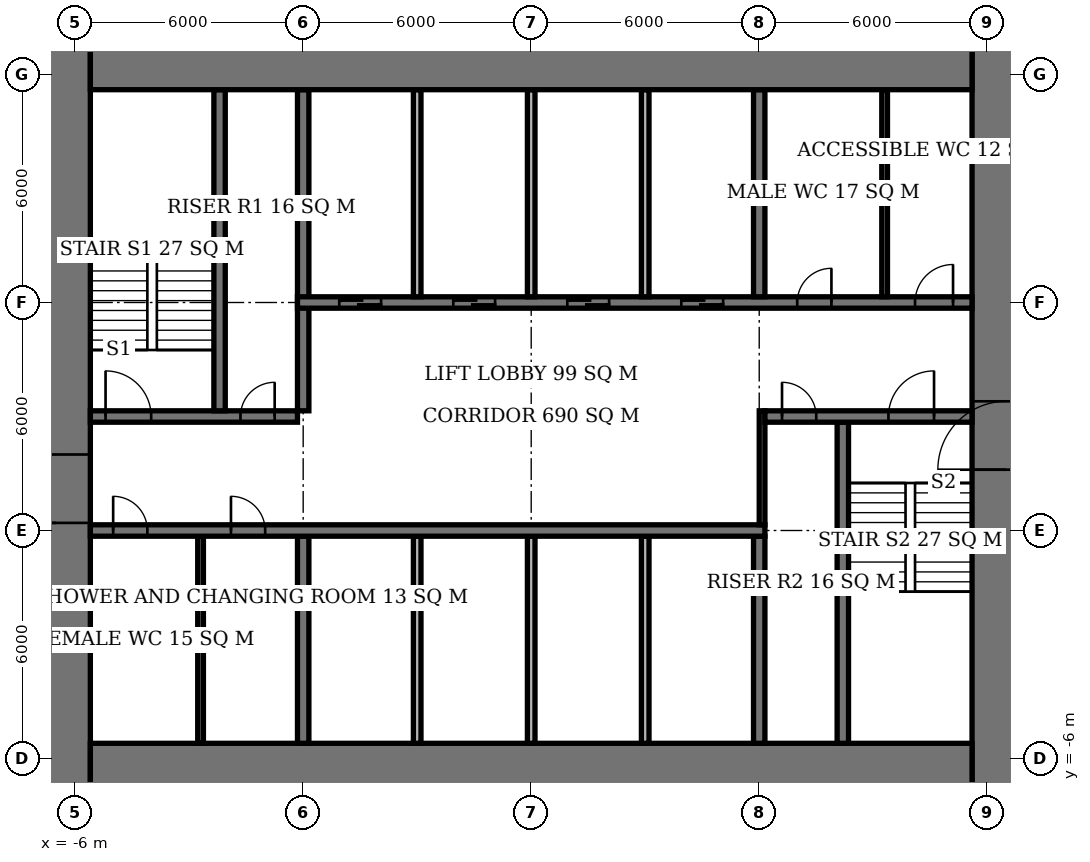
"""IFC4 building model, lengths in metres.
Left out: names, types, materials, properties, quantities, classifications, styles, units other than length and angle.
Written with IfcOpenShell. Run it as: python <this file> out.ifc"""

import sys

from ifc_helpers import new_model, si_unit, direction, frame, frame_2d, origin, place, context, subcontext, project, spatial, rectangle, extrude, element, fill, save


model = new_model("IFC4")
c1 = context("Model", 3, precision=1e-05, world=origin(), true_north=direction((0.0, 1.0)))
c2 = subcontext(c1, "Body", "Model", "MODEL_VIEW")
j1 = project(units=[si_unit("LENGTHUNIT", "METRE"), si_unit("PLANEANGLEUNIT", "RADIAN")], contexts=[c1])
p1 = place(None, origin())
s1 = spatial("IfcSite", under=j1, at=p1, CompositionType="ELEMENT")
p2 = place(p1, origin())
s2 = spatial("IfcBuilding", under=s1, at=p2, CompositionType="ELEMENT")
p3 = place(p2, frame((0.0, 0.0, 72.8)))
s3 = spatial("IfcBuildingStorey", under=s2, at=p3, CompositionType="ELEMENT", Elevation=72.8)
for number, where, z_axis, x_axis in (
    (1, (-5.6, -6.6, 0.0), (0.0, 0.0, 1.0), (1.0, 0.0, 0.0)),
    (2, (-5.6, 12.6, 0.0), (0.0, 0.0, 1.0), (1.0, 0.0, 0.0)),
):
    element("IfcWall", number, at=place(p3, frame(where, z_axis=z_axis, x_axis=x_axis)), inside=s3, PredefinedType="SHEAR", context=c2, shape_type="SweptSolid", body=[
        extrude(rectangle(XDim=23.2, YDim=2.0, at=frame_2d((11.6, 0.0))), origin(), (0.0, 0.0, 1.0), 3.9),
    ])
p4 = place(p3, frame((-6.5, -7.6, 0.0), z_axis=(0.0, 0.0, 1.0), x_axis=(0.0, 1.0, 0.0)))
e3 = element("IfcWall", 3, at=p4, inside=s3, PredefinedType="SHEAR", context=c2, shape_type="SweptSolid", body=[
    extrude(rectangle(XDim=21.2, YDim=1.8, at=frame_2d((10.6, 0.0))), origin(), (0.0, 0.0, 1.0), 3.9),
])
p5 = place(p4, frame((7.8, 0.0, 0.0)))
e4 = element("IfcOpeningElement", 4, at=p5, cuts=e3, PredefinedType="OPENING", context=c2, shape_type="SweptSolid", body=[
    extrude(rectangle(XDim=1.8, YDim=2.4, at=frame_2d((0.9, 1.2))), frame((0.0, 0.91, 0.0), z_axis=(0.0, -1.0, 0.0), x_axis=(1.0, 0.0, 0.0)), (0.0, 0.0, 1.0), 1.82),
])
p6 = place(p3, frame((18.5, -7.6, 0.0), z_axis=(0.0, 0.0, 1.0), x_axis=(0.0, 1.0, 0.0)))
e5 = element("IfcWall", 5, at=p6, inside=s3, PredefinedType="SHEAR", context=c2, shape_type="SweptSolid", body=[
    extrude(rectangle(XDim=21.2, YDim=1.8, at=frame_2d((10.6, 0.0))), origin(), (0.0, 0.0, 1.0), 3.9),
])
p7 = place(p6, frame((9.2, 0.0, 0.0)))
e6 = element("IfcOpeningElement", 6, at=p7, cuts=e5, PredefinedType="OPENING", context=c2, shape_type="SweptSolid", body=[
    extrude(rectangle(XDim=1.8, YDim=2.4, at=frame_2d((0.9, 1.2))), frame((0.0, 0.91, 0.0), z_axis=(0.0, -1.0, 0.0), x_axis=(1.0, 0.0, 0.0)), (0.0, 0.0, 1.0), 1.82),
])
p8 = place(p3, frame((-5.6, 0.0, 0.0), z_axis=(0.0, 0.0, 1.0), x_axis=(1.0, 0.0, 0.0)))
e7 = element("IfcWall", 7, at=p8, inside=s3, PredefinedType="SHEAR", context=c2, shape_type="SweptSolid", body=[
    extrude(rectangle(XDim=17.75, YDim=0.3, at=frame_2d((8.875, 0.0))), origin(), (0.0, 0.0, 1.0), 3.9),
])
p9 = place(p8, frame((0.6, 0.0, 0.0)))
e8 = element("IfcOpeningElement", 8, at=p9, cuts=e7, PredefinedType="OPENING", context=c2, shape_type="SweptSolid", body=[
    extrude(rectangle(XDim=0.9, YDim=2.1, at=frame_2d((0.45, 1.05))), frame((0.0, 0.16, 0.0), z_axis=(0.0, -1.0, 0.0), x_axis=(1.0, 0.0, 0.0)), (0.0, 0.0, 1.0), 0.32),
])
p10 = place(p8, frame((3.7, 0.0, 0.0)))
e9 = element("IfcOpeningElement", 9, at=p10, cuts=e7, PredefinedType="OPENING", context=c2, shape_type="SweptSolid", body=[
    extrude(rectangle(XDim=0.9, YDim=2.1, at=frame_2d((0.45, 1.05))), frame((0.0, 0.16, 0.0), z_axis=(0.0, -1.0, 0.0), x_axis=(1.0, 0.0, 0.0)), (0.0, 0.0, 1.0), 0.32),
])
p11 = place(p3, frame((-5.6, 3.0, 0.0), z_axis=(0.0, 0.0, 1.0), x_axis=(1.0, 0.0, 0.0)))
e10 = element("IfcWall", 10, at=p11, inside=s3, PredefinedType="SHEAR", context=c2, shape_type="SweptSolid", body=[
    extrude(rectangle(XDim=5.45, YDim=0.3, at=frame_2d((2.725, 0.0))), origin(), (0.0, 0.0, 1.0), 3.9),
])
p12 = place(p11, frame((0.4, 0.0, 0.0)))
e11 = element("IfcOpeningElement", 11, at=p12, cuts=e10, PredefinedType="OPENING", context=c2, shape_type="SweptSolid", body=[
    extrude(rectangle(XDim=1.2, YDim=2.1, at=frame_2d((0.6, 1.05))), frame((0.0, 0.16, 0.0), z_axis=(0.0, -1.0, 0.0), x_axis=(1.0, 0.0, 0.0)), (0.0, 0.0, 1.0), 0.32),
])
p13 = place(p11, frame((3.95, 0.0, 0.0)))
e12 = element("IfcOpeningElement", 12, at=p13, cuts=e10, PredefinedType="OPENING", context=c2, shape_type="SweptSolid", body=[
    extrude(rectangle(XDim=0.9, YDim=2.1, at=frame_2d((0.45, 1.05))), frame((0.0, 0.16, 0.0), z_axis=(0.0, -1.0, 0.0), x_axis=(1.0, 0.0, 0.0)), (0.0, 0.0, 1.0), 0.32),
])
p14 = place(p3, frame((12.15, 3.0, 0.0), z_axis=(0.0, 0.0, 1.0), x_axis=(1.0, 0.0, 0.0)))
e13 = element("IfcWall", 13, at=p14, inside=s3, PredefinedType="SHEAR", context=c2, shape_type="SweptSolid", body=[
    extrude(rectangle(XDim=5.45, YDim=0.3, at=frame_2d((2.725, 0.0))), origin(), (0.0, 0.0, 1.0), 3.9),
])
p15 = place(p14, frame((3.25, 0.0, 0.0)))
e14 = element("IfcOpeningElement", 14, at=p15, cuts=e13, PredefinedType="OPENING", context=c2, shape_type="SweptSolid", body=[
    extrude(rectangle(XDim=1.2, YDim=2.1, at=frame_2d((0.6, 1.05))), frame((0.0, 0.16, 0.0), z_axis=(0.0, -1.0, 0.0), x_axis=(1.0, 0.0, 0.0)), (0.0, 0.0, 1.0), 0.32),
])
p16 = place(p14, frame((0.45, 0.0, 0.0)))
e15 = element("IfcOpeningElement", 15, at=p16, cuts=e13, PredefinedType="OPENING", context=c2, shape_type="SweptSolid", body=[
    extrude(rectangle(XDim=0.9, YDim=2.1, at=frame_2d((0.45, 1.05))), frame((0.0, 0.16, 0.0), z_axis=(0.0, -1.0, 0.0), x_axis=(1.0, 0.0, 0.0)), (0.0, 0.0, 1.0), 0.32),
])
p17 = place(p3, frame((-0.15, 6.0, 0.0), z_axis=(0.0, 0.0, 1.0), x_axis=(1.0, 0.0, 0.0)))
e16 = element("IfcWall", 16, at=p17, inside=s3, PredefinedType="SHEAR", context=c2, shape_type="SweptSolid", body=[
    extrude(rectangle(XDim=17.75, YDim=0.3, at=frame_2d((8.875, 0.0))), origin(), (0.0, 0.0, 1.0), 3.9),
])
p18 = place(p17, frame((13.15, 0.0, 0.0)))
e17 = element("IfcOpeningElement", 17, at=p18, cuts=e16, PredefinedType="OPENING", context=c2, shape_type="SweptSolid", body=[
    extrude(rectangle(XDim=0.9, YDim=2.1, at=frame_2d((0.45, 1.05))), frame((0.0, 0.16, 0.0), z_axis=(0.0, -1.0, 0.0), x_axis=(1.0, 0.0, 0.0)), (0.0, 0.0, 1.0), 0.32),
])
p19 = place(p17, frame((16.25, 0.0, 0.0)))
e18 = element("IfcOpeningElement", 18, at=p19, cuts=e16, PredefinedType="OPENING", context=c2, shape_type="SweptSolid", body=[
    extrude(rectangle(XDim=1.0, YDim=2.1, at=frame_2d((0.5, 1.05))), frame((0.0, 0.16, 0.0), z_axis=(0.0, -1.0, 0.0), x_axis=(1.0, 0.0, 0.0)), (0.0, 0.0, 1.0), 0.32),
])
p20 = place(p17, frame((1.1, 0.0, 0.0)))
e19 = element("IfcOpeningElement", 19, at=p20, cuts=e16, PredefinedType="OPENING", context=c2, shape_type="SweptSolid", body=[
    extrude(rectangle(XDim=1.1, YDim=2.1, at=frame_2d((0.55, 1.05))), frame((0.0, 0.16, 0.0), z_axis=(0.0, -1.0, 0.0), x_axis=(1.0, 0.0, 0.0)), (0.0, 0.0, 1.0), 0.32),
])
p21 = place(p17, frame((4.1, 0.0, 0.0)))
e20 = element("IfcOpeningElement", 20, at=p21, cuts=e16, PredefinedType="OPENING", context=c2, shape_type="SweptSolid", body=[
    extrude(rectangle(XDim=1.1, YDim=2.1, at=frame_2d((0.55, 1.05))), frame((0.0, 0.16, 0.0), z_axis=(0.0, -1.0, 0.0), x_axis=(1.0, 0.0, 0.0)), (0.0, 0.0, 1.0), 0.32),
])
p22 = place(p17, frame((7.1, 0.0, 0.0)))
e21 = element("IfcOpeningElement", 21, at=p22, cuts=e16, PredefinedType="OPENING", context=c2, shape_type="SweptSolid", body=[
    extrude(rectangle(XDim=1.1, YDim=2.1, at=frame_2d((0.55, 1.05))), frame((0.0, 0.16, 0.0), z_axis=(0.0, -1.0, 0.0), x_axis=(1.0, 0.0, 0.0)), (0.0, 0.0, 1.0), 0.32),
])
p23 = place(p17, frame((10.1, 0.0, 0.0)))
e22 = element("IfcOpeningElement", 22, at=p23, cuts=e16, PredefinedType="OPENING", context=c2, shape_type="SweptSolid", body=[
    extrude(rectangle(XDim=1.1, YDim=2.1, at=frame_2d((0.55, 1.05))), frame((0.0, 0.16, 0.0), z_axis=(0.0, -1.0, 0.0), x_axis=(1.0, 0.0, 0.0)), (0.0, 0.0, 1.0), 0.32),
])
p24 = place(p3, frame((0.0, -5.6, 0.0), z_axis=(0.0, 0.0, 1.0), x_axis=(0.0, 1.0, 0.0)))
e23 = element("IfcWall", 23, at=p24, inside=s3, PredefinedType="SHEAR", context=c2, shape_type="SweptSolid", body=[
    extrude(rectangle(XDim=5.45, YDim=0.3, at=frame_2d((2.725, 0.0))), origin(), (0.0, 0.0, 1.0), 3.9),
])
p25 = place(p3, frame((0.0, 3.15, 0.0), z_axis=(0.0, 0.0, 1.0), x_axis=(0.0, 1.0, 0.0)))
e24 = element("IfcWall", 24, at=p25, inside=s3, PredefinedType="SHEAR", context=c2, shape_type="SweptSolid", body=[
    extrude(rectangle(XDim=8.45, YDim=0.3, at=frame_2d((4.225, 0.0))), origin(), (0.0, 0.0, 1.0), 3.9),
])
for number, where, z_axis, x_axis in (
    (25, (12.0, -5.6, 0.0), (0.0, 0.0, 1.0), (0.0, 1.0, 0.0)),
    (26, (12.0, 6.15, 0.0), (0.0, 0.0, 1.0), (0.0, 1.0, 0.0)),
):
    element("IfcWall", number, at=place(p3, frame(where, z_axis=z_axis, x_axis=x_axis)), inside=s3, PredefinedType="SHEAR", context=c2, shape_type="SweptSolid", body=[
        extrude(rectangle(XDim=5.45, YDim=0.3, at=frame_2d((2.725, 0.0))), origin(), (0.0, 0.0, 1.0), 3.9),
    ])
for number, where, z_axis, x_axis in (
    (27, (-2.2, 3.15, 0.0), (0.0, 0.0, 1.0), (0.0, 1.0, 0.0)),
    (28, (14.2, -5.6, 0.0), (0.0, 0.0, 1.0), (0.0, 1.0, 0.0)),
):
    element("IfcWall", number, at=place(p3, frame(where, z_axis=z_axis, x_axis=x_axis)), inside=s3, PredefinedType="SHEAR", context=c2, shape_type="SweptSolid", body=[
        extrude(rectangle(XDim=8.45, YDim=0.3, at=frame_2d((4.225, 0.0))), origin(), (0.0, 0.0, 1.0), 3.9),
    ])
for number, where, z_axis, x_axis in (
    (29, (3.0, 6.15, 0.0), (0.0, 0.0, 1.0), (0.0, 1.0, 0.0)),
    (30, (6.0, 6.15, 0.0), (0.0, 0.0, 1.0), (0.0, 1.0, 0.0)),
    (31, (9.0, 6.15, 0.0), (0.0, 0.0, 1.0), (0.0, 1.0, 0.0)),
    (32, (3.0, -5.6, 0.0), (0.0, 0.0, 1.0), (0.0, 1.0, 0.0)),
    (33, (6.0, -5.6, 0.0), (0.0, 0.0, 1.0), (0.0, 1.0, 0.0)),
    (34, (9.0, -5.6, 0.0), (0.0, 0.0, 1.0), (0.0, 1.0, 0.0)),
):
    element("IfcWall", number, at=place(p3, frame(where, z_axis=z_axis, x_axis=x_axis)), inside=s3, PredefinedType="SOLIDWALL", context=c2, shape_type="SweptSolid", body=[
        extrude(rectangle(XDim=5.45, YDim=0.2, at=frame_2d((2.725, 0.0))), origin(), (0.0, 0.0, 1.0), 3.9),
    ])
for number, where, z_axis, x_axis in (
    (35, (-2.7, -5.6, 0.0), (0.0, 0.0, 1.0), (0.0, 1.0, 0.0)),
    (36, (15.3, 6.15, 0.0), (0.0, 0.0, 1.0), (0.0, 1.0, 0.0)),
):
    element("IfcWall", number, at=place(p3, frame(where, z_axis=z_axis, x_axis=x_axis)), inside=s3, PredefinedType="PLUMBINGWALL", context=c2, shape_type="SweptSolid", body=[
        extrude(rectangle(XDim=5.45, YDim=0.15, at=frame_2d((2.725, 0.0))), origin(), (0.0, 0.0, 1.0), 3.65),
    ])
p26 = place(p3, frame((12.075, 0.15, 0.0), z_axis=(0.0, 0.0, 1.0), x_axis=(0.0, 1.0, 0.0)))
e37 = element("IfcWall", 37, at=p26, inside=s3, PredefinedType="PARTITIONING", context=c2, shape_type="SweptSolid", body=[
    extrude(rectangle(XDim=3.0, YDim=0.15, at=frame_2d((1.5, 0.0))), origin(), (0.0, 0.0, 1.0), 3.65),
])
p27 = place(p5, origin())
e38 = element("IfcDoor", 38, at=p27, inside=s3, OperationType="DOUBLE_DOOR_SINGLE_SWING", PredefinedType="DOOR", context=c2, shape_type="SweptSolid", body=[
    extrude(rectangle(XDim=1.8, YDim=2.4, at=frame_2d((0.9, 1.2))), frame((0.0, 0.025, 0.0), z_axis=(0.0, -1.0, 0.0), x_axis=(1.0, 0.0, 0.0)), (0.0, 0.0, 1.0), 0.05),
])
fill(e4, e38)
p28 = place(p7, origin())
e39 = element("IfcDoor", 39, at=p28, inside=s3, OperationType="DOUBLE_DOOR_SINGLE_SWING", PredefinedType="DOOR", context=c2, shape_type="SweptSolid", body=[
    extrude(rectangle(XDim=1.8, YDim=2.4, at=frame_2d((0.9, 1.2))), frame((0.0, 0.025, 0.0), z_axis=(0.0, -1.0, 0.0), x_axis=(1.0, 0.0, 0.0)), (0.0, 0.0, 1.0), 0.05),
])
fill(e6, e39)
p29 = place(p12, origin())
e40 = element("IfcDoor", 40, at=p29, inside=s3, OperationType="SINGLE_SWING_LEFT", PredefinedType="DOOR", context=c2, shape_type="SweptSolid", body=[
    extrude(rectangle(XDim=1.2, YDim=2.1, at=frame_2d((0.6, 1.05))), frame((0.0, 0.025, 0.0), z_axis=(0.0, -1.0, 0.0), x_axis=(1.0, 0.0, 0.0)), (0.0, 0.0, 1.0), 0.05),
])
fill(e11, e40)
p30 = place(p13, origin())
e41 = element("IfcDoor", 41, at=p30, inside=s3, OperationType="SINGLE_SWING_RIGHT", PredefinedType="DOOR", context=c2, shape_type="SweptSolid", body=[
    extrude(rectangle(XDim=0.9, YDim=2.1, at=frame_2d((0.45, 1.05))), frame((0.0, 0.025, 0.0), z_axis=(0.0, -1.0, 0.0), x_axis=(1.0, 0.0, 0.0)), (0.0, 0.0, 1.0), 0.05),
])
fill(e12, e41)
p31 = place(p15, origin())
e42 = element("IfcDoor", 42, at=p31, inside=s3, OperationType="SINGLE_SWING_RIGHT", PredefinedType="DOOR", context=c2, shape_type="SweptSolid", body=[
    extrude(rectangle(XDim=1.2, YDim=2.1, at=frame_2d((0.6, 1.05))), frame((0.0, 0.025, 0.0), z_axis=(0.0, -1.0, 0.0), x_axis=(1.0, 0.0, 0.0)), (0.0, 0.0, 1.0), 0.05),
])
fill(e14, e42)
p32 = place(p16, origin())
e43 = element("IfcDoor", 43, at=p32, inside=s3, OperationType="SINGLE_SWING_LEFT", PredefinedType="DOOR", context=c2, shape_type="SweptSolid", body=[
    extrude(rectangle(XDim=0.9, YDim=2.1, at=frame_2d((0.45, 1.05))), frame((0.0, 0.025, 0.0), z_axis=(0.0, -1.0, 0.0), x_axis=(1.0, 0.0, 0.0)), (0.0, 0.0, 1.0), 0.05),
])
fill(e15, e43)
p33 = place(p9, origin())
e44 = element("IfcDoor", 44, at=p33, inside=s3, OperationType="SINGLE_SWING_LEFT", PredefinedType="DOOR", context=c2, shape_type="SweptSolid", body=[
    extrude(rectangle(XDim=0.9, YDim=2.1, at=frame_2d((0.45, 1.05))), frame((0.0, 0.025, 0.0), z_axis=(0.0, -1.0, 0.0), x_axis=(1.0, 0.0, 0.0)), (0.0, 0.0, 1.0), 0.05),
])
fill(e8, e44)
p34 = place(p10, origin())
e45 = element("IfcDoor", 45, at=p34, inside=s3, OperationType="SINGLE_SWING_LEFT", PredefinedType="DOOR", context=c2, shape_type="SweptSolid", body=[
    extrude(rectangle(XDim=0.9, YDim=2.1, at=frame_2d((0.45, 1.05))), frame((0.0, 0.025, 0.0), z_axis=(0.0, -1.0, 0.0), x_axis=(1.0, 0.0, 0.0)), (0.0, 0.0, 1.0), 0.05),
])
fill(e9, e45)
p35 = place(p18, origin())
e46 = element("IfcDoor", 46, at=p35, inside=s3, OperationType="SINGLE_SWING_RIGHT", PredefinedType="DOOR", context=c2, shape_type="SweptSolid", body=[
    extrude(rectangle(XDim=0.9, YDim=2.1, at=frame_2d((0.45, 1.05))), frame((0.0, 0.025, 0.0), z_axis=(0.0, -1.0, 0.0), x_axis=(1.0, 0.0, 0.0)), (0.0, 0.0, 1.0), 0.05),
])
fill(e17, e46)
p36 = place(p19, origin())
e47 = element("IfcDoor", 47, at=p36, inside=s3, OperationType="SINGLE_SWING_RIGHT", PredefinedType="DOOR", context=c2, shape_type="SweptSolid", body=[
    extrude(rectangle(XDim=1.0, YDim=2.1, at=frame_2d((0.5, 1.05))), frame((0.0, 0.025, 0.0), z_axis=(0.0, -1.0, 0.0), x_axis=(1.0, 0.0, 0.0)), (0.0, 0.0, 1.0), 0.05),
])
fill(e18, e47)
p37 = place(p20, origin())
e48 = element("IfcDoor", 48, at=p37, inside=s3, OperationType="DOUBLE_DOOR_SLIDING", PredefinedType="USERDEFINED", context=c2, shape_type="SweptSolid", body=[
    extrude(rectangle(XDim=1.1, YDim=2.1, at=frame_2d((0.55, 1.05))), frame((0.0, 0.025, 0.0), z_axis=(0.0, -1.0, 0.0), x_axis=(1.0, 0.0, 0.0)), (0.0, 0.0, 1.0), 0.05),
])
fill(e19, e48)
p38 = place(p21, origin())
e49 = element("IfcDoor", 49, at=p38, inside=s3, OperationType="DOUBLE_DOOR_SLIDING", PredefinedType="USERDEFINED", context=c2, shape_type="SweptSolid", body=[
    extrude(rectangle(XDim=1.1, YDim=2.1, at=frame_2d((0.55, 1.05))), frame((0.0, 0.025, 0.0), z_axis=(0.0, -1.0, 0.0), x_axis=(1.0, 0.0, 0.0)), (0.0, 0.0, 1.0), 0.05),
])
fill(e20, e49)
p39 = place(p22, origin())
e50 = element("IfcDoor", 50, at=p39, inside=s3, OperationType="DOUBLE_DOOR_SLIDING", PredefinedType="USERDEFINED", context=c2, shape_type="SweptSolid", body=[
    extrude(rectangle(XDim=1.1, YDim=2.1, at=frame_2d((0.55, 1.05))), frame((0.0, 0.025, 0.0), z_axis=(0.0, -1.0, 0.0), x_axis=(1.0, 0.0, 0.0)), (0.0, 0.0, 1.0), 0.05),
])
fill(e21, e50)
p40 = place(p23, origin())
e51 = element("IfcDoor", 51, at=p40, inside=s3, OperationType="DOUBLE_DOOR_SLIDING", PredefinedType="USERDEFINED", context=c2, shape_type="SweptSolid", body=[
    extrude(rectangle(XDim=1.1, YDim=2.1, at=frame_2d((0.55, 1.05))), frame((0.0, 0.025, 0.0), z_axis=(0.0, -1.0, 0.0), x_axis=(1.0, 0.0, 0.0)), (0.0, 0.0, 1.0), 0.05),
])
fill(e22, e51)
save(model, sys.argv[1])
